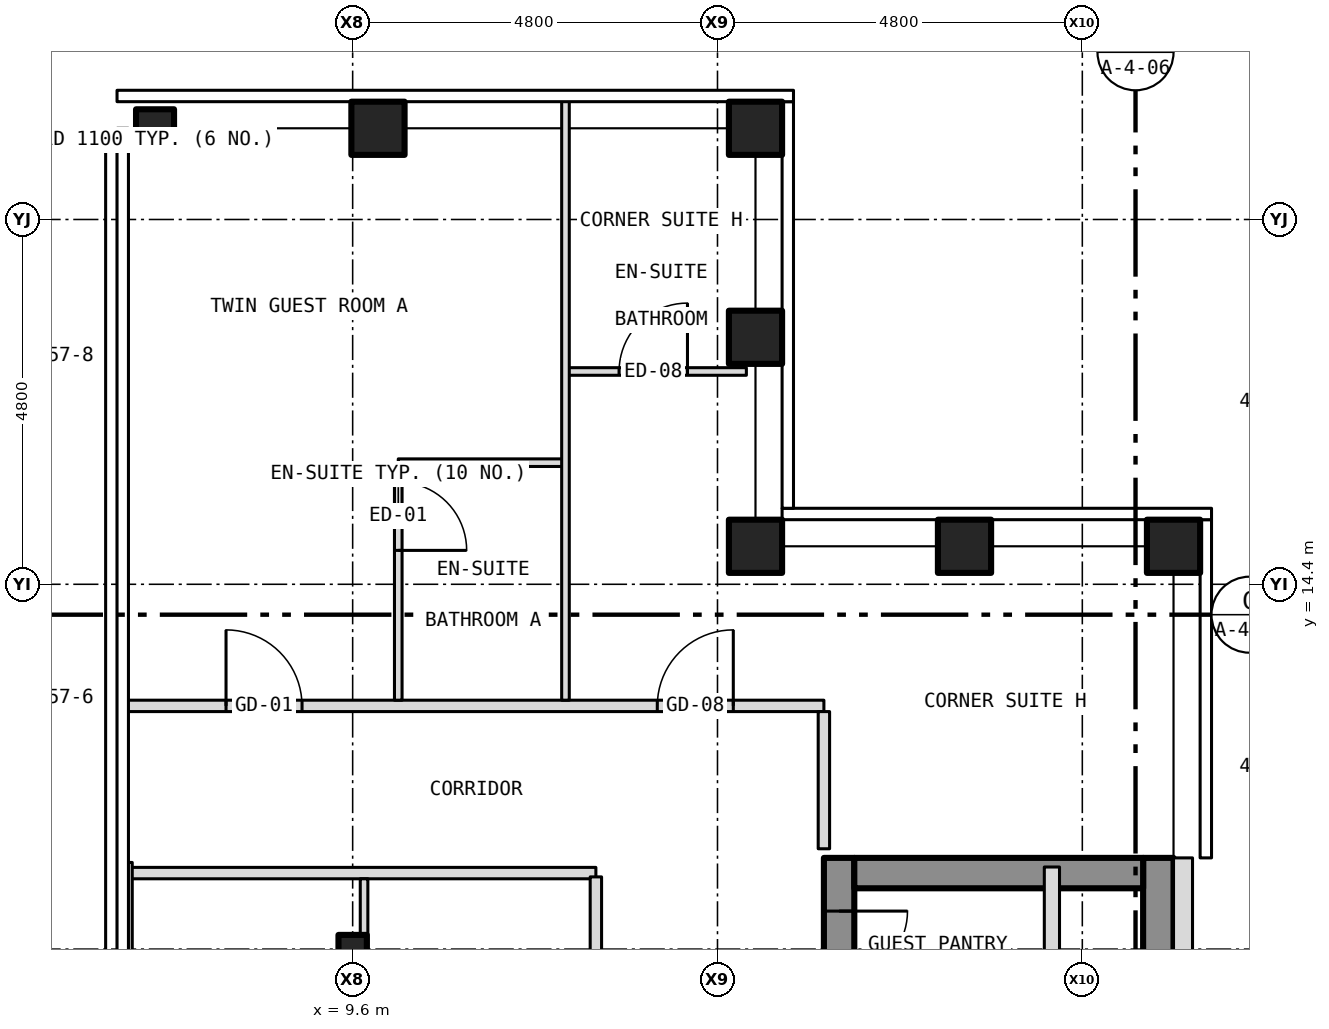
"""IFC4 building model, lengths in metres.
Left out: names, types, materials, properties, quantities, classifications, styles, units other than length and angle.
Written with IfcOpenShell. Run it as: python <this file> out.ifc"""

import sys

from ifc_helpers import new_model, si_unit, direction, frame, frame_2d, origin, origin_2d, place, context, subcontext, project, spatial, rectangle, hollow_rectangle, i_section, extrude, element, fill, save


model = new_model("IFC4")
c1 = context("Model", 3, precision=1e-05, world=origin(), true_north=direction((0.0, 1.0)))
c2 = subcontext(c1, "Body", "Model", "MODEL_VIEW")
j1 = project(units=[si_unit("LENGTHUNIT", "METRE"), si_unit("PLANEANGLEUNIT", "RADIAN")], contexts=[c1])
p1 = place(None, origin())
s1 = spatial("IfcSite", under=j1, at=p1, CompositionType="ELEMENT")
p2 = place(p1, origin())
s2 = spatial("IfcBuilding", under=s1, at=p2, CompositionType="ELEMENT")
p3 = place(p2, frame((0.0, 0.0, 219.0)))
s3 = spatial("IfcBuildingStorey", under=s2, at=p3, CompositionType="ELEMENT", Elevation=219.0)
for number, where, z_axis, x_axis in (
    (1, (9.933, 20.4, -0.15), (0.0, 0.0, 1.0), (1.0, 0.0, 0.0)),
    (2, (14.9, 20.4, -0.15), (0.0, 0.0, 1.0), (1.0, 0.0, 0.0)),
    (3, (20.4, 14.9, -0.15), (0.0, 0.0, 1.0), (1.0, 0.0, 0.0)),
    (4, (14.9, 14.9, -0.15), (0.0, 0.0, 1.0), (1.0, 0.0, 0.0)),
    (5, (14.9, 17.65, -0.15), (0.0, 0.0, 1.0), (1.0, 0.0, 0.0)),
    (6, (17.65, 14.9, -0.15), (0.0, 0.0, 1.0), (1.0, 0.0, 0.0)),
):
    element("IfcColumn", number, at=place(p3, frame(where, z_axis=z_axis, x_axis=x_axis)), inside=s3, PredefinedType="COLUMN", context=c2, shape_type="SweptSolid", body=[
        extrude(hollow_rectangle(XDim=0.7, YDim=0.7, WallThickness=0.04, at=origin_2d()), origin(), (0.0, 0.0, 1.0), 3.5),
    ])
p4 = place(p3, frame((7.0, 20.4, -0.15), z_axis=(0.0, 0.0, 1.0), x_axis=(1.0, 0.0, 0.0)))
e7 = element("IfcColumn", 7, at=p4, inside=s3, PredefinedType="COLUMN", context=c2, shape_type="SweptSolid", body=[
    extrude(hollow_rectangle(XDim=0.5, YDim=0.5, WallThickness=0.03, at=origin_2d()), origin(), (0.0, 0.0, 1.0), 3.5),
])
p5 = place(p3, frame((9.6, 9.6, -0.15), z_axis=(0.0, 0.0, 1.0), x_axis=(1.0, 0.0, 0.0)))
e8 = element("IfcColumn", 8, at=p5, inside=s3, PredefinedType="COLUMN", context=c2, shape_type="SweptSolid", body=[
    extrude(i_section(OverallWidth=0.373, OverallDepth=0.373, WebThickness=0.016, FlangeThickness=0.026, at=origin_2d()), origin(), (0.0, 0.0, 1.0), 3.5),
])
p6 = place(p3, frame((16.0, -10.8, 0.0), z_axis=(0.0, 0.0, 1.0), x_axis=(0.0, 1.0, 0.0)))
e9 = element("IfcWall", 9, at=p6, inside=s3, PredefinedType="SHEAR", context=c2, shape_type="SweptSolid", body=[
    extrude(rectangle(XDim=21.6, YDim=0.4, at=frame_2d((10.8, 0.0))), origin(), (0.0, 0.0, 1.0), 3.25),
])
p7 = place(p6, frame((9.4, 0.0, 0.0)))
e10 = element("IfcOpeningElement", 10, at=p7, cuts=e9, PredefinedType="OPENING", context=c2, shape_type="SweptSolid", body=[
    extrude(rectangle(XDim=1.1, YDim=2.1, at=frame_2d((0.55, 1.05))), frame((0.0, 0.212, 0.0), z_axis=(0.0, -1.0, 0.0), x_axis=(1.0, 0.0, 0.0)), (0.0, 0.0, 1.0), 0.424),
])
p8 = place(p6, frame((11.5, 0.0, 0.0)))
e11 = element("IfcOpeningElement", 11, at=p8, cuts=e9, PredefinedType="OPENING", context=c2, shape_type="SweptSolid", body=[
    extrude(rectangle(XDim=1.1, YDim=2.1, at=frame_2d((0.55, 1.05))), frame((0.0, 0.212, 0.0), z_axis=(0.0, -1.0, 0.0), x_axis=(1.0, 0.0, 0.0)), (0.0, 0.0, 1.0), 0.424),
])
p9 = place(p6, frame((13.6, 0.0, 0.0)))
e12 = element("IfcOpeningElement", 12, at=p9, cuts=e9, PredefinedType="OPENING", context=c2, shape_type="SweptSolid", body=[
    extrude(rectangle(XDim=1.1, YDim=2.1, at=frame_2d((0.55, 1.05))), frame((0.0, 0.212, 0.0), z_axis=(0.0, -1.0, 0.0), x_axis=(1.0, 0.0, 0.0)), (0.0, 0.0, 1.0), 0.424),
])
p10 = place(p6, frame((15.7, 0.0, 0.0)))
e13 = element("IfcOpeningElement", 13, at=p10, cuts=e9, PredefinedType="OPENING", context=c2, shape_type="SweptSolid", body=[
    extrude(rectangle(XDim=1.1, YDim=2.1, at=frame_2d((0.55, 1.05))), frame((0.0, 0.212, 0.0), z_axis=(0.0, -1.0, 0.0), x_axis=(1.0, 0.0, 0.0)), (0.0, 0.0, 1.0), 0.424),
])
p11 = place(p6, frame((17.8, 0.0, 0.0)))
e14 = element("IfcOpeningElement", 14, at=p11, cuts=e9, PredefinedType="OPENING", context=c2, shape_type="SweptSolid", body=[
    extrude(rectangle(XDim=1.1, YDim=2.1, at=frame_2d((0.55, 1.05))), frame((0.0, 0.212, 0.0), z_axis=(0.0, -1.0, 0.0), x_axis=(1.0, 0.0, 0.0)), (0.0, 0.0, 1.0), 0.424),
])
p12 = place(p6, frame((5.642, 0.0, 0.0)))
e15 = element("IfcOpeningElement", 15, at=p12, cuts=e9, PredefinedType="OPENING", context=c2, shape_type="SweptSolid", body=[
    extrude(rectangle(XDim=1.1, YDim=2.1, at=frame_2d((0.55, 1.05))), frame((0.0, 0.212, 0.0), z_axis=(0.0, -1.0, 0.0), x_axis=(1.0, 0.0, 0.0)), (0.0, 0.0, 1.0), 0.424),
])
p13 = place(p6, frame((7.5, 0.0, 0.0)))
e16 = element("IfcOpeningElement", 16, at=p13, cuts=e9, PredefinedType="OPENING", context=c2, shape_type="SweptSolid", body=[
    extrude(rectangle(XDim=1.1, YDim=2.1, at=frame_2d((0.55, 1.05))), frame((0.0, 0.212, 0.0), z_axis=(0.0, -1.0, 0.0), x_axis=(1.0, 0.0, 0.0)), (0.0, 0.0, 1.0), 0.424),
])
p14 = place(p6, frame((20.0, 0.0, 0.0)))
e17 = element("IfcOpeningElement", 17, at=p14, cuts=e9, PredefinedType="OPENING", context=c2, shape_type="SweptSolid", body=[
    extrude(rectangle(XDim=0.9, YDim=2.1, at=frame_2d((0.45, 1.05))), frame((0.0, 0.212, 0.0), z_axis=(0.0, -1.0, 0.0), x_axis=(1.0, 0.0, 0.0)), (0.0, 0.0, 1.0), 0.424),
])
p15 = place(p3, frame((20.2, -10.8, 0.0), z_axis=(0.0, 0.0, 1.0), x_axis=(0.0, 1.0, 0.0)))
e18 = element("IfcWall", 18, at=p15, inside=s3, PredefinedType="SHEAR", context=c2, shape_type="SweptSolid", body=[
    extrude(rectangle(XDim=21.6, YDim=0.4, at=frame_2d((10.8, 0.0))), origin(), (0.0, 0.0, 1.0), 3.25),
])
p16 = place(p3, frame((16.2, 10.6, 0.0), z_axis=(0.0, 0.0, 1.0), x_axis=(1.0, 0.0, 0.0)))
e19 = element("IfcWall", 19, at=p16, inside=s3, PredefinedType="SHEAR", context=c2, shape_type="SweptSolid", body=[
    extrude(rectangle(XDim=3.8, YDim=0.4, at=frame_2d((1.9, 0.0))), origin(), (0.0, 0.0, 1.0), 3.25),
])
p17 = place(p3, frame((20.525, -10.8, 0.0), z_axis=(0.0, 0.0, 1.0), x_axis=(0.0, 1.0, 0.0)))
e20 = element("IfcWall", 20, at=p17, inside=s3, PredefinedType="SOLIDWALL", context=c2, shape_type="SweptSolid", body=[
    extrude(rectangle(XDim=21.6, YDim=0.25, at=frame_2d((10.8, 0.0))), origin(), (0.0, 0.0, 1.0), 3.5),
])
p18 = place(p17, frame((2.95, 0.0, 1.0)))
e21 = element("IfcOpeningElement", 21, at=p18, cuts=e20, PredefinedType="OPENING", context=c2, shape_type="SweptSolid", body=[
    extrude(rectangle(XDim=0.6, YDim=1.5, at=frame_2d((0.3, 0.75))), frame((0.0, 0.137, 0.0), z_axis=(0.0, -1.0, 0.0), x_axis=(1.0, 0.0, 0.0)), (0.0, 0.0, 1.0), 0.274),
])
p19 = place(p3, frame((6.65, 10.6, 0.0), z_axis=(0.0, 0.0, 1.0), x_axis=(1.0, 0.0, 0.0)))
e22 = element("IfcWall", 22, at=p19, inside=s3, PredefinedType="PARTITIONING", context=c2, shape_type="SweptSolid", body=[
    extrude(rectangle(XDim=6.15, YDim=0.15, at=frame_2d((3.075, 0.0))), origin(), (0.0, 0.0, 1.0), 3.35),
])
p20 = place(p3, frame((6.62, 12.8, 0.0), z_axis=(0.0, 0.0, 1.0), x_axis=(1.0, 0.0, 0.0)))
e23 = element("IfcWall", 23, at=p20, inside=s3, PredefinedType="PARTITIONING", context=c2, shape_type="SweptSolid", body=[
    extrude(rectangle(XDim=9.18, YDim=0.15, at=frame_2d((4.59, 0.0))), origin(), (0.0, 0.0, 1.0), 3.35),
])
p21 = place(p20, frame((1.314, 0.0, 0.0)))
e24 = element("IfcOpeningElement", 24, at=p21, cuts=e23, PredefinedType="OPENING", context=c2, shape_type="SweptSolid", body=[
    extrude(rectangle(XDim=1.0, YDim=2.1, at=frame_2d((0.5, 1.05))), frame((0.0, 0.087, 0.0), z_axis=(0.0, -1.0, 0.0), x_axis=(1.0, 0.0, 0.0)), (0.0, 0.0, 1.0), 0.174),
])
p22 = place(p20, frame((6.988, 0.0, 0.0)))
e25 = element("IfcOpeningElement", 25, at=p22, cuts=e23, PredefinedType="OPENING", context=c2, shape_type="SweptSolid", body=[
    extrude(rectangle(XDim=1.0, YDim=2.1, at=frame_2d((0.5, 1.05))), frame((0.0, 0.087, 0.0), z_axis=(0.0, -1.0, 0.0), x_axis=(1.0, 0.0, 0.0)), (0.0, 0.0, 1.0), 0.174),
])
p23 = place(p3, frame((10.2, 16.0, 0.0), z_axis=(0.0, 0.0, 1.0), x_axis=(1.0, 0.0, 0.0)))
e26 = element("IfcWall", 26, at=p23, inside=s3, PredefinedType="PARTITIONING", context=c2, shape_type="SweptSolid", body=[
    extrude(rectangle(XDim=2.2, YDim=0.1, at=frame_2d((1.1, 0.0))), origin(), (0.0, 0.0, 1.0), 3.35),
])
p24 = place(p3, frame((12.4, 17.2, 0.0), z_axis=(0.0, 0.0, 1.0), x_axis=(1.0, 0.0, 0.0)))
e27 = element("IfcWall", 27, at=p24, inside=s3, PredefinedType="PARTITIONING", context=c2, shape_type="SweptSolid", body=[
    extrude(rectangle(XDim=2.38, YDim=0.1, at=frame_2d((1.19, 0.0))), origin(), (0.0, 0.0, 1.0), 3.35),
])
p25 = place(p24, frame((0.705, 0.0, 0.0)))
e28 = element("IfcOpeningElement", 28, at=p25, cuts=e27, PredefinedType="OPENING", context=c2, shape_type="SweptSolid", body=[
    extrude(rectangle(XDim=0.9, YDim=2.1, at=frame_2d((0.45, 1.05))), frame((0.0, 0.062, 0.0), z_axis=(0.0, -1.0, 0.0), x_axis=(1.0, 0.0, 0.0)), (0.0, 0.0, 1.0), 0.124),
])
p26 = place(p3, frame((6.65, 3.16, 0.0), z_axis=(0.0, 0.0, 1.0), x_axis=(0.0, 1.0, 0.0)))
e29 = element("IfcWall", 29, at=p26, inside=s3, PredefinedType="PARTITIONING", context=c2, shape_type="SweptSolid", body=[
    extrude(rectangle(XDim=7.58, YDim=0.1, at=frame_2d((3.79, 0.0))), origin(), (0.0, 0.0, 1.0), 3.35),
])
p27 = place(p3, frame((9.75, 9.413, 0.0), z_axis=(0.0, 0.0, 1.0), x_axis=(0.0, 1.0, 0.0)))
e30 = element("IfcWall", 30, at=p27, inside=s3, PredefinedType="PARTITIONING", context=c2, shape_type="SweptSolid", body=[
    extrude(rectangle(XDim=0.374, YDim=0.1, at=frame_2d((0.187, 0.0))), origin(), (0.0, 0.0, 1.0), 3.35),
])
p28 = place(p3, frame((9.75, 9.787, 0.0), z_axis=(0.0, 0.0, 1.0), x_axis=(0.0, 1.0, 0.0)))
e31 = element("IfcWall", 31, at=p28, inside=s3, PredefinedType="PARTITIONING", context=c2, shape_type="SweptSolid", body=[
    extrude(rectangle(XDim=0.738, YDim=0.1, at=frame_2d((0.369, 0.0))), origin(), (0.0, 0.0, 1.0), 2.728),
])
p29 = place(p3, frame((10.2, 12.875, 0.0), z_axis=(0.0, 0.0, 1.0), x_axis=(0.0, 1.0, 0.0)))
e32 = element("IfcWall", 32, at=p29, inside=s3, PredefinedType="PARTITIONING", context=c2, shape_type="SweptSolid", body=[
    extrude(rectangle(XDim=3.075, YDim=0.1, at=frame_2d((1.538, 0.0))), origin(), (0.0, 0.0, 1.0), 3.35),
])
p30 = place(p29, frame((1.971, 0.0, 0.0)))
e33 = element("IfcOpeningElement", 33, at=p30, cuts=e32, PredefinedType="OPENING", context=c2, shape_type="SweptSolid", body=[
    extrude(rectangle(XDim=0.9, YDim=2.1, at=frame_2d((0.45, 1.05))), frame((0.0, 0.062, 0.0), z_axis=(0.0, -1.0, 0.0), x_axis=(1.0, 0.0, 0.0)), (0.0, 0.0, 1.0), 0.124),
])
p31 = place(p3, frame((12.4, 12.875, 0.0), z_axis=(0.0, 0.0, 1.0), x_axis=(0.0, 1.0, 0.0)))
e34 = element("IfcWall", 34, at=p31, inside=s3, PredefinedType="PARTITIONING", context=c2, shape_type="SweptSolid", body=[
    extrude(rectangle(XDim=7.905, YDim=0.1, at=frame_2d((3.953, 0.0))), origin(), (0.0, 0.0, 1.0), 3.35),
])
p32 = place(p3, frame((12.8, 3.375, 0.0), z_axis=(0.0, 0.0, 1.0), x_axis=(0.0, 1.0, 0.0)))
e35 = element("IfcWall", 35, at=p32, inside=s3, PredefinedType="PARTITIONING", context=c2, shape_type="SweptSolid", body=[
    extrude(rectangle(XDim=7.175, YDim=0.15, at=frame_2d((3.587, 0.0))), origin(), (0.0, 0.0, 1.0), 3.35),
])
p33 = place(p32, frame((3.125, 0.0, 0.0)))
e36 = element("IfcOpeningElement", 36, at=p33, cuts=e35, PredefinedType="OPENING", context=c2, shape_type="SweptSolid", body=[
    extrude(rectangle(XDim=0.9, YDim=2.1, at=frame_2d((0.45, 1.05))), frame((0.0, 0.087, 0.0), z_axis=(0.0, -1.0, 0.0), x_axis=(1.0, 0.0, 0.0)), (0.0, 0.0, 1.0), 0.174),
])
p34 = place(p3, frame((15.8, 10.92, 0.0), z_axis=(0.0, 0.0, 1.0), x_axis=(0.0, 1.0, 0.0)))
e37 = element("IfcWall", 37, at=p34, inside=s3, PredefinedType="PARTITIONING", context=c2, shape_type="SweptSolid", body=[
    extrude(rectangle(XDim=1.805, YDim=0.15, at=frame_2d((0.903, 0.0))), origin(), (0.0, 0.0, 1.0), 3.35),
])
p35 = place(p3, frame((18.8, -1.8, 0.0), z_axis=(0.0, 0.0, 1.0), x_axis=(0.0, 1.0, 0.0)))
e38 = element("IfcWall", 38, at=p35, inside=s3, PredefinedType="PARTITIONING", context=c2, shape_type="SweptSolid", body=[
    extrude(rectangle(XDim=12.48, YDim=0.2, at=frame_2d((6.24, 0.0))), origin(), (0.0, 0.0, 1.0), 3.25),
])
p36 = place(p14, origin())
e39 = element("IfcDoor", 39, at=p36, inside=s3, OperationType="SINGLE_SWING_RIGHT", PredefinedType="DOOR", context=c2, shape_type="SweptSolid", body=[
    extrude(rectangle(XDim=0.9, YDim=2.1, at=frame_2d((0.45, 1.05))), frame((0.0, 0.025, 0.0), z_axis=(0.0, -1.0, 0.0), x_axis=(1.0, 0.0, 0.0)), (0.0, 0.0, 1.0), 0.05),
])
fill(e17, e39)
p37 = place(p21, origin())
e40 = element("IfcDoor", 40, at=p37, inside=s3, OperationType="SINGLE_SWING_LEFT", PredefinedType="DOOR", context=c2, shape_type="SweptSolid", body=[
    extrude(rectangle(XDim=1.0, YDim=2.1, at=frame_2d((0.5, 1.05))), frame((0.0, 0.025, 0.0), z_axis=(0.0, -1.0, 0.0), x_axis=(1.0, 0.0, 0.0)), (0.0, 0.0, 1.0), 0.05),
])
fill(e24, e40)
p38 = place(p30, origin())
e41 = element("IfcDoor", 41, at=p38, inside=s3, OperationType="SINGLE_SWING_LEFT", PredefinedType="DOOR", context=c2, shape_type="SweptSolid", body=[
    extrude(rectangle(XDim=0.9, YDim=2.1, at=frame_2d((0.45, 1.05))), frame((0.0, 0.025, 0.0), z_axis=(0.0, -1.0, 0.0), x_axis=(1.0, 0.0, 0.0)), (0.0, 0.0, 1.0), 0.05),
])
fill(e33, e41)
p39 = place(p25, origin())
e42 = element("IfcDoor", 42, at=p39, inside=s3, OperationType="SINGLE_SWING_RIGHT", PredefinedType="DOOR", context=c2, shape_type="SweptSolid", body=[
    extrude(rectangle(XDim=0.9, YDim=2.1, at=frame_2d((0.45, 1.05))), frame((0.0, 0.025, 0.0), z_axis=(0.0, -1.0, 0.0), x_axis=(1.0, 0.0, 0.0)), (0.0, 0.0, 1.0), 0.05),
])
fill(e28, e42)
p40 = place(p22, origin())
e43 = element("IfcDoor", 43, at=p40, inside=s3, OperationType="SINGLE_SWING_RIGHT", PredefinedType="DOOR", context=c2, shape_type="SweptSolid", body=[
    extrude(rectangle(XDim=1.0, YDim=2.1, at=frame_2d((0.5, 1.05))), frame((0.0, 0.025, 0.0), z_axis=(0.0, -1.0, 0.0), x_axis=(1.0, 0.0, 0.0)), (0.0, 0.0, 1.0), 0.05),
])
fill(e25, e43)
save(model, sys.argv[1])
